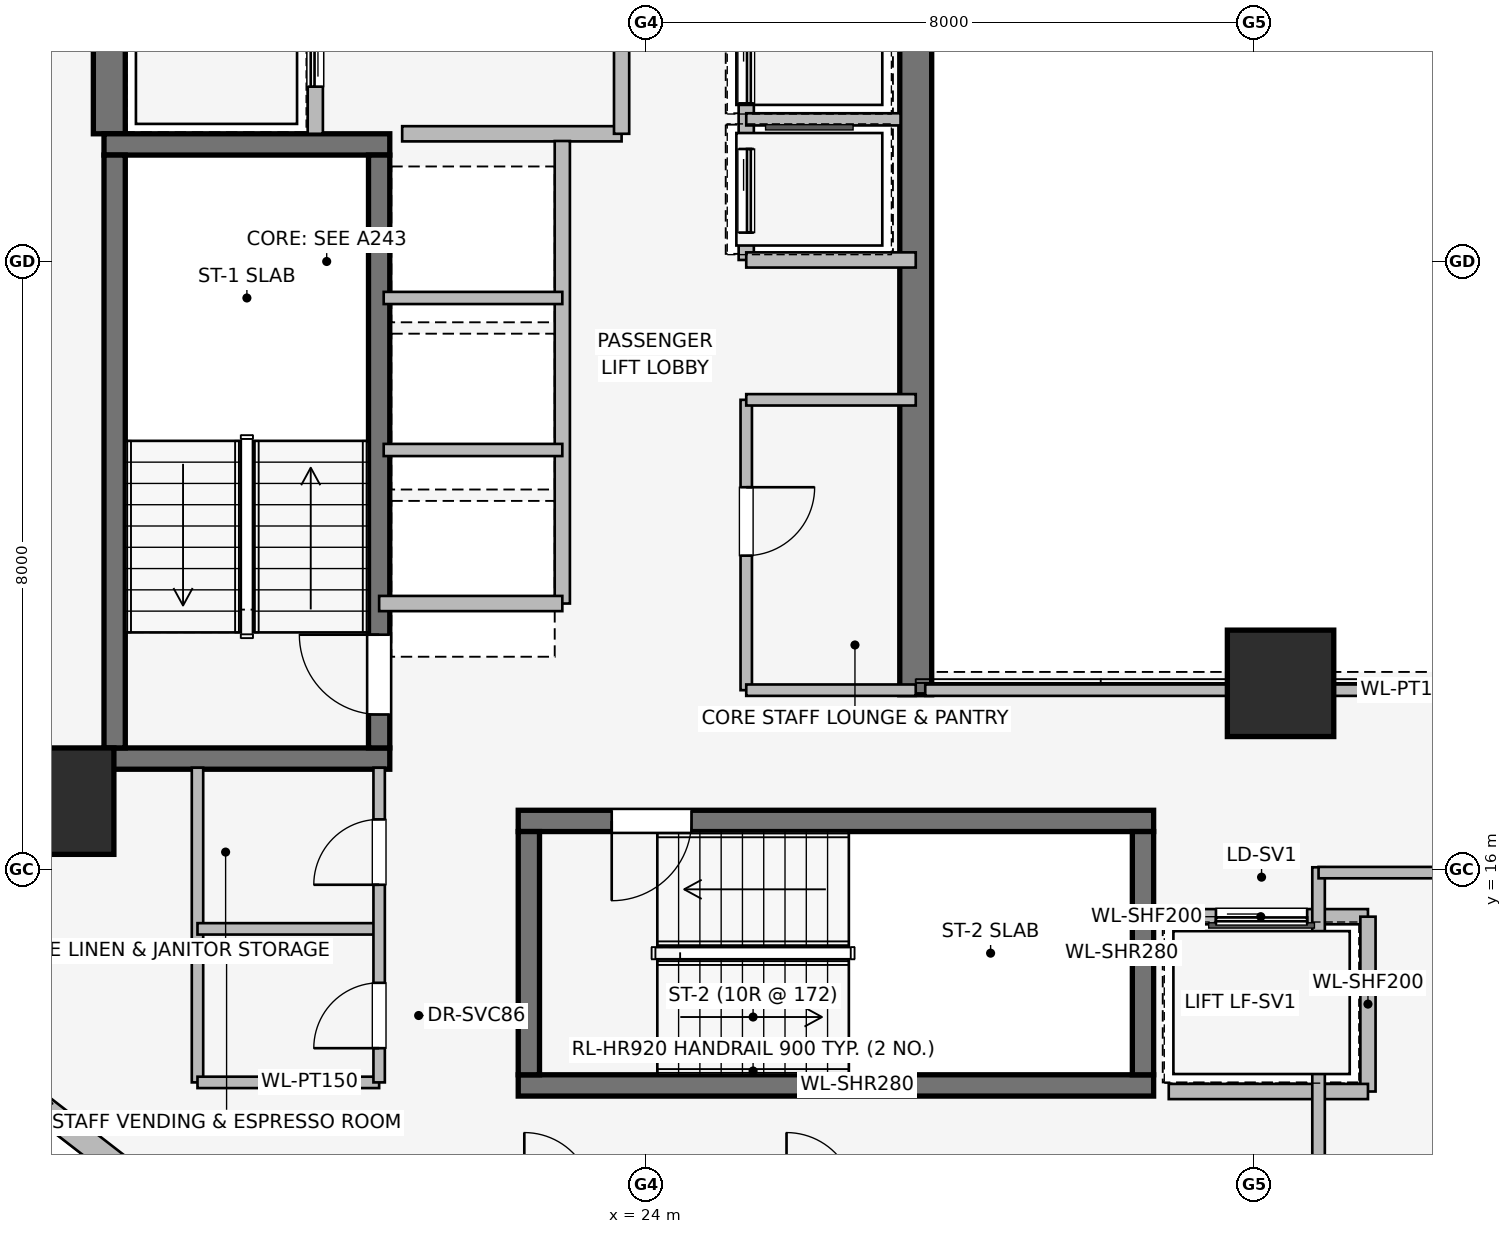
"""IFC4 building model, lengths in metres.
Left out: names, types, materials, properties, quantities, classifications, styles, units other than length and angle.
Written with IfcOpenShell. Run it as: python <this file> out.ifc"""

import sys

from ifc_helpers import new_model, si_unit, direction, frame, frame_2d, origin, origin_2d, place, context, subcontext, project, spatial, rectangle, extrude, element, fill, save


model = new_model("IFC4")
c1 = context("Model", 3, precision=1e-05, world=origin(), true_north=direction((0.0, 1.0)))
c2 = subcontext(c1, "Body", "Model", "MODEL_VIEW")
j1 = project(units=[si_unit("LENGTHUNIT", "METRE"), si_unit("PLANEANGLEUNIT", "RADIAN")], contexts=[c1])
p1 = place(None, origin())
s1 = spatial("IfcSite", under=j1, at=p1, CompositionType="ELEMENT")
p2 = place(p1, origin())
s2 = spatial("IfcBuilding", under=s1, at=p2, CompositionType="ELEMENT")
p3 = place(p2, frame((0.0, 0.0, 153.3)))
s3 = spatial("IfcBuildingStorey", under=s2, at=p3, CompositionType="ELEMENT", Elevation=153.3)
p4 = place(p3, frame((16.94, 25.68, 0.0), z_axis=(0.0, 0.0, 1.0), x_axis=(0.0, 1.0, 0.0)))
e1 = element("IfcWall", 1, at=p4, inside=s3, PredefinedType="SHEAR", context=c2, shape_type="SweptSolid", body=[
    extrude(rectangle(XDim=5.62, YDim=0.42, at=frame_2d((2.81, 0.0))), origin(), (0.0, 0.0, 1.0), 3.45),
])
p5 = place(p3, frame((27.55, 29.55, 0.0), z_axis=(0.0, 0.0, 1.0), x_axis=(0.0, -1.0, 0.0)))
e2 = element("IfcWall", 2, at=p5, inside=s3, PredefinedType="SHEAR", context=c2, shape_type="SweptSolid", body=[
    extrude(rectangle(XDim=11.25, YDim=0.42, at=frame_2d((5.625, 0.0))), origin(), (0.0, 0.0, 1.0), 3.45),
])
for number, where, z_axis, x_axis in (
    (3, (16.87, 17.46, 0.0), (0.0, 0.0, 1.0), (1.0, 0.0, 0.0)),
    (4, (20.63, 25.54, 0.0), (0.0, 0.0, 1.0), (-1.0, 0.0, 0.0)),
):
    element("IfcWall", number, at=place(p3, frame(where, z_axis=z_axis, x_axis=x_axis)), inside=s3, PredefinedType="SHEAR", context=c2, shape_type="SweptSolid", body=[
        extrude(rectangle(XDim=3.76, YDim=0.28, at=frame_2d((1.88, 0.0))), origin(), (0.0, 0.0, 1.0), 3.45),
    ])
p6 = place(p3, frame((17.01, 25.4, 0.0), z_axis=(0.0, 0.0, 1.0), x_axis=(0.0, -1.0, 0.0)))
e5 = element("IfcWall", 5, at=p6, inside=s3, PredefinedType="SHEAR", context=c2, shape_type="SweptSolid", body=[
    extrude(rectangle(XDim=7.8, YDim=0.28, at=frame_2d((3.9, 0.0))), origin(), (0.0, 0.0, 1.0), 3.45),
])
p7 = place(p3, frame((20.49, 17.6, 0.0), z_axis=(0.0, 0.0, 1.0), x_axis=(0.0, 1.0, 0.0)))
e6 = element("IfcWall", 6, at=p7, inside=s3, PredefinedType="SHEAR", context=c2, shape_type="SweptSolid", body=[
    extrude(rectangle(XDim=7.8, YDim=0.28, at=frame_2d((3.9, 0.0))), origin(), (0.0, 0.0, 1.0), 3.45),
])
p8 = place(p7, frame((0.44, 0.0, 0.0)))
e7 = element("IfcOpeningElement", 7, at=p8, cuts=e6, PredefinedType="OPENING", context=c2, shape_type="SweptSolid", body=[
    extrude(rectangle(XDim=1.05, YDim=2.0, at=frame_2d((0.525, 1.0))), frame((0.0, 0.15, 0.0), z_axis=(0.0, -1.0, 0.0), x_axis=(1.0, 0.0, 0.0)), (0.0, 0.0, 1.0), 0.3),
])
p9 = place(p3, frame((22.32, 13.16, 0.0), z_axis=(0.0, 0.0, 1.0), x_axis=(1.0, 0.0, 0.0)))
e8 = element("IfcWall", 8, at=p9, inside=s3, PredefinedType="SHEAR", context=c2, shape_type="SweptSolid", body=[
    extrude(rectangle(XDim=8.36, YDim=0.28, at=frame_2d((4.18, 0.0))), origin(), (0.0, 0.0, 1.0), 3.45),
])
p10 = place(p3, frame((30.68, 16.64, 0.0), z_axis=(0.0, 0.0, 1.0), x_axis=(-1.0, 0.0, 0.0)))
e9 = element("IfcWall", 9, at=p10, inside=s3, PredefinedType="SHEAR", context=c2, shape_type="SweptSolid", body=[
    extrude(rectangle(XDim=8.36, YDim=0.28, at=frame_2d((4.18, 0.0))), origin(), (0.0, 0.0, 1.0), 3.45),
])
p11 = place(p10, frame((6.08, 0.0, 0.0)))
e10 = element("IfcOpeningElement", 10, at=p11, cuts=e9, PredefinedType="OPENING", context=c2, shape_type="SweptSolid", body=[
    extrude(rectangle(XDim=1.05, YDim=2.0, at=frame_2d((0.525, 1.0))), frame((0.0, 0.15, 0.0), z_axis=(0.0, -1.0, 0.0), x_axis=(1.0, 0.0, 0.0)), (0.0, 0.0, 1.0), 0.3),
])
for number, where, z_axis, x_axis in (
    (11, (22.46, 16.5, 0.0), (0.0, 0.0, 1.0), (0.0, -1.0, 0.0)),
    (12, (30.54, 13.3, 0.0), (0.0, 0.0, 1.0), (0.0, 1.0, 0.0)),
):
    element("IfcWall", number, at=place(p3, frame(where, z_axis=z_axis, x_axis=x_axis)), inside=s3, PredefinedType="SHEAR", context=c2, shape_type="SweptSolid", body=[
        extrude(rectangle(XDim=3.2, YDim=0.28, at=frame_2d((1.6, 0.0))), origin(), (0.0, 0.0, 1.0), 3.45),
    ])
for number, where, z_axis, x_axis in (
    (13, (16.3, 16.9, 0.0), (0.0, 0.0, 1.0), (1.0, 0.0, 0.0)),
    (14, (32.35, 18.45, 0.0), (0.0, 0.0, 1.0), (1.0, 0.0, 0.0)),
):
    element("IfcColumn", number, at=place(p3, frame(where, z_axis=z_axis, x_axis=x_axis)), inside=s3, PredefinedType="COLUMN", context=c2, shape_type="SweptSolid", body=[
        extrude(rectangle(XDim=1.4, YDim=1.4, at=origin_2d()), origin(), (0.0, 0.0, 1.0), 3.45),
    ])
p12 = place(p3, frame((17.243, 11.95, 0.0), z_axis=(0.0, 0.0, 1.0), x_axis=(-0.790621329885, 0.612305408053, 0.0)))
e15 = element("IfcWall", 15, at=p12, inside=s3, PredefinedType="STANDARD", context=c2, shape_type="SweptSolid", body=[
    extrude(rectangle(XDim=1.676, YDim=0.33, at=frame_2d((0.838, 0.0))), origin(), (0.0, 0.0, 1.0), 3.19),
])
p13 = place(p3, frame((19.65, 25.68, 0.0), z_axis=(0.0, 0.0, 1.0), x_axis=(0.0, 1.0, 0.0)))
e16 = element("IfcWall", 16, at=p13, inside=s3, PredefinedType="PARTITIONING", context=c2, shape_type="SweptSolid", body=[
    extrude(rectangle(XDim=5.54, YDim=0.2, at=frame_2d((2.77, 0.0))), origin(), (0.0, 0.0, 1.0), 3.19),
])
p14 = place(p13, frame((0.62, 0.0, 0.0)))
e17 = element("IfcOpeningElement", 17, at=p14, cuts=e16, PredefinedType="OPENING", context=c2, shape_type="SweptSolid", body=[
    extrude(rectangle(XDim=1.1, YDim=2.2, at=frame_2d((0.55, 1.1))), frame((0.0, 0.11, 0.0), z_axis=(0.0, -1.0, 0.0), x_axis=(1.0, 0.0, 0.0)), (0.0, 0.0, 1.0), 0.22),
])
p15 = place(p13, frame((3.12, 0.0, 0.0)))
e18 = element("IfcOpeningElement", 18, at=p15, cuts=e16, PredefinedType="OPENING", context=c2, shape_type="SweptSolid", body=[
    extrude(rectangle(XDim=1.1, YDim=2.2, at=frame_2d((0.55, 1.1))), frame((0.0, 0.11, 0.0), z_axis=(0.0, -1.0, 0.0), x_axis=(1.0, 0.0, 0.0)), (0.0, 0.0, 1.0), 0.22),
])
p16 = place(p3, frame((20.793, 25.68, 0.0), z_axis=(0.0, 0.0, 1.0), x_axis=(1.0, 0.0, 0.0)))
e19 = element("IfcWall", 19, at=p16, inside=s3, PredefinedType="PARTITIONING", context=c2, shape_type="SweptSolid", body=[
    extrude(rectangle(XDim=2.887, YDim=0.2, at=frame_2d((1.443, 0.0))), origin(), (0.0, 0.0, 1.0), 3.19),
])
p17 = place(p3, frame((23.68, 25.68, 0.0), z_axis=(0.0, 0.0, 1.0), x_axis=(0.0, 1.0, 0.0)))
e20 = element("IfcWall", 20, at=p17, inside=s3, PredefinedType="PARTITIONING", context=c2, shape_type="SweptSolid", body=[
    extrude(rectangle(XDim=5.54, YDim=0.2, at=frame_2d((2.77, 0.0))), origin(), (0.0, 0.0, 1.0), 3.19),
])
p18 = place(p17, frame((1.8, 0.0, 0.0)))
e21 = element("IfcOpeningElement", 21, at=p18, cuts=e20, PredefinedType="OPENING", context=c2, shape_type="SweptSolid", body=[
    extrude(rectangle(XDim=1.05, YDim=2.0, at=frame_2d((0.525, 1.0))), frame((0.0, 0.11, 0.0), z_axis=(0.0, -1.0, 0.0), x_axis=(1.0, 0.0, 0.0)), (0.0, 0.0, 1.0), 0.22),
])
p19 = place(p3, frame((33.5, 15.38, 0.0), z_axis=(0.0, 0.0, 1.0), x_axis=(-1.0, 0.0, 0.0)))
e22 = element("IfcWall", 22, at=p19, inside=s3, PredefinedType="PARTITIONING", context=c2, shape_type="SweptSolid", body=[
    extrude(rectangle(XDim=2.82, YDim=0.2, at=frame_2d((1.41, 0.0))), origin(), (0.0, 0.0, 1.0), 3.19),
])
p20 = place(p19, frame((0.8, 0.0, 0.0)))
e23 = element("IfcOpeningElement", 23, at=p20, cuts=e22, PredefinedType="OPENING", context=c2, shape_type="SweptSolid", body=[
    extrude(rectangle(XDim=1.2, YDim=2.2, at=frame_2d((0.6, 1.1))), frame((0.0, 0.11, 0.0), z_axis=(0.0, -1.0, 0.0), x_axis=(1.0, 0.0, 0.0)), (0.0, 0.0, 1.0), 0.22),
])
p21 = place(p3, frame((33.5, 13.08, 0.0), z_axis=(0.0, 0.0, 1.0), x_axis=(0.0, 1.0, 0.0)))
e24 = element("IfcWall", 24, at=p21, inside=s3, PredefinedType="PARTITIONING", context=c2, shape_type="SweptSolid", body=[
    extrude(rectangle(XDim=2.3, YDim=0.2, at=frame_2d((1.15, 0.0))), origin(), (0.0, 0.0, 1.0), 3.19),
])
p22 = place(p3, frame((30.879, 13.08, 0.0), z_axis=(0.0, 0.0, 1.0), x_axis=(1.0, 0.0, 0.0)))
e25 = element("IfcWall", 25, at=p22, inside=s3, PredefinedType="PARTITIONING", context=c2, shape_type="SweptSolid", body=[
    extrude(rectangle(XDim=2.621, YDim=0.2, at=frame_2d((1.311, 0.0))), origin(), (0.0, 0.0, 1.0), 3.19),
])
p23 = place(p3, frame((22.9, 19.5, 0.0), z_axis=(0.0, 0.0, 1.0), x_axis=(0.0, 1.0, 0.0)))
e26 = element("IfcWall", 26, at=p23, inside=s3, PredefinedType="PARTITIONING", context=c2, shape_type="SweptSolid", body=[
    extrude(rectangle(XDim=6.085, YDim=0.2, at=frame_2d((3.042, 0.0))), origin(), (0.0, 0.0, 1.0), 3.19),
])
p24 = place(p3, frame((20.49, 19.5, 0.0), z_axis=(0.0, 0.0, 1.0), x_axis=(1.0, 0.0, 0.0)))
e27 = element("IfcWall", 27, at=p24, inside=s3, PredefinedType="PARTITIONING", context=c2, shape_type="SweptSolid", body=[
    extrude(rectangle(XDim=2.41, YDim=0.2, at=frame_2d((1.205, 0.0))), origin(), (0.0, 0.0, 1.0), 2.09),
])
for number, where, z_axis, x_axis in (
    (28, (20.55, 21.52, 0.0), (0.0, 0.0, 1.0), (1.0, 0.0, 0.0)),
    (29, (20.55, 23.52, 0.0), (0.0, 0.0, 1.0), (1.0, 0.0, 0.0)),
):
    element("IfcWall", number, at=place(p3, frame(where, z_axis=z_axis, x_axis=x_axis)), inside=s3, PredefinedType="PARTITIONING", context=c2, shape_type="SweptSolid", body=[
        extrude(rectangle(XDim=2.35, YDim=0.16, at=frame_2d((1.175, 0.0))), origin(), (0.0, 0.0, 1.0), 3.19),
    ])
p25 = place(p3, frame((25.32, 29.55, 0.0), z_axis=(0.0, 0.0, 1.0), x_axis=(0.0, -1.0, 0.0)))
e30 = element("IfcWall", 30, at=p25, inside=s3, PredefinedType="PARTITIONING", context=c2, shape_type="SweptSolid", body=[
    extrude(rectangle(XDim=5.53, YDim=0.2, at=frame_2d((2.765, 0.0))), origin(), (0.0, 0.0, 1.0), 3.19),
])
p26 = place(p25, frame((0.52, 0.0, 0.0)))
e31 = element("IfcOpeningElement", 31, at=p26, cuts=e30, PredefinedType="OPENING", context=c2, shape_type="SweptSolid", body=[
    extrude(rectangle(XDim=1.1, YDim=2.2, at=frame_2d((0.55, 1.1))), frame((0.0, 0.11, 0.0), z_axis=(0.0, -1.0, 0.0), x_axis=(1.0, 0.0, 0.0)), (0.0, 0.0, 1.0), 0.22),
])
p27 = place(p25, frame((2.37, 0.0, 0.0)))
e32 = element("IfcOpeningElement", 32, at=p27, cuts=e30, PredefinedType="OPENING", context=c2, shape_type="SweptSolid", body=[
    extrude(rectangle(XDim=1.1, YDim=2.2, at=frame_2d((0.55, 1.1))), frame((0.0, 0.11, 0.0), z_axis=(0.0, -1.0, 0.0), x_axis=(1.0, 0.0, 0.0)), (0.0, 0.0, 1.0), 0.22),
])
p28 = place(p25, frame((4.07, 0.0, 0.0)))
e33 = element("IfcOpeningElement", 33, at=p28, cuts=e30, PredefinedType="OPENING", context=c2, shape_type="SweptSolid", body=[
    extrude(rectangle(XDim=1.1, YDim=2.2, at=frame_2d((0.55, 1.1))), frame((0.0, 0.11, 0.0), z_axis=(0.0, -1.0, 0.0), x_axis=(1.0, 0.0, 0.0)), (0.0, 0.0, 1.0), 0.22),
])
p29 = place(p3, frame((25.32, 24.02, 0.0), z_axis=(0.0, 0.0, 1.0), x_axis=(1.0, 0.0, 0.0)))
e34 = element("IfcWall", 34, at=p29, inside=s3, PredefinedType="PARTITIONING", context=c2, shape_type="SweptSolid", body=[
    extrude(rectangle(XDim=2.23, YDim=0.2, at=frame_2d((1.115, 0.0))), origin(), (0.0, 0.0, 1.0), 3.19),
])
p30 = place(p3, frame((25.32, 25.87, 0.0), z_axis=(0.0, 0.0, 1.0), x_axis=(1.0, 0.0, 0.0)))
e35 = element("IfcWall", 35, at=p30, inside=s3, PredefinedType="PARTITIONING", context=c2, shape_type="SweptSolid", body=[
    extrude(rectangle(XDim=2.03, YDim=0.16, at=frame_2d((1.015, 0.0))), origin(), (0.0, 0.0, 1.0), 3.19),
])
p31 = place(p3, frame((25.32, 22.18, 0.0), z_axis=(0.0, 0.0, 1.0), x_axis=(0.0, -1.0, 0.0)))
e36 = element("IfcWall", 36, at=p31, inside=s3, PredefinedType="PARTITIONING", context=c2, shape_type="SweptSolid", body=[
    extrude(rectangle(XDim=3.82, YDim=0.15, at=frame_2d((1.91, 0.0))), origin(), (0.0, 0.0, 1.0), 3.19),
])
p32 = place(p31, frame((1.15, 0.0, 0.0)))
e37 = element("IfcOpeningElement", 37, at=p32, cuts=e36, PredefinedType="OPENING", context=c2, shape_type="SweptSolid", body=[
    extrude(rectangle(XDim=0.9, YDim=2.0, at=frame_2d((0.45, 1.0))), frame((0.0, 0.085, 0.0), z_axis=(0.0, -1.0, 0.0), x_axis=(1.0, 0.0, 0.0)), (0.0, 0.0, 1.0), 0.17),
])
for number, where, z_axis, x_axis in (
    (38, (25.32, 22.18, 0.0), (0.0, 0.0, 1.0), (1.0, 0.0, 0.0)),
    (39, (25.32, 18.36, 0.0), (0.0, 0.0, 1.0), (1.0, 0.0, 0.0)),
):
    element("IfcWall", number, at=place(p3, frame(where, z_axis=z_axis, x_axis=x_axis)), inside=s3, PredefinedType="PARTITIONING", context=c2, shape_type="SweptSolid", body=[
        extrude(rectangle(XDim=2.23, YDim=0.15, at=frame_2d((1.115, 0.0))), origin(), (0.0, 0.0, 1.0), 3.19),
    ])
p33 = place(p3, frame((18.1, 17.34, 0.0), z_axis=(0.0, 0.0, 1.0), x_axis=(0.0, -1.0, 0.0)))
e40 = element("IfcWall", 40, at=p33, inside=s3, PredefinedType="PARTITIONING", context=c2, shape_type="SweptSolid", body=[
    extrude(rectangle(XDim=4.14, YDim=0.15, at=frame_2d((2.07, 0.0))), origin(), (0.0, 0.0, 1.0), 3.19),
])
for number, where, z_axis, x_axis in (
    (41, (18.1, 13.2, 0.0), (0.0, 0.0, 1.0), (1.0, 0.0, 0.0)),
    (42, (18.1, 15.22, 0.0), (0.0, 0.0, 1.0), (1.0, 0.0, 0.0)),
):
    element("IfcWall", number, at=place(p3, frame(where, z_axis=z_axis, x_axis=x_axis)), inside=s3, PredefinedType="PARTITIONING", context=c2, shape_type="SweptSolid", body=[
        extrude(rectangle(XDim=2.39, YDim=0.15, at=frame_2d((1.195, 0.0))), origin(), (0.0, 0.0, 1.0), 3.19),
    ])
p34 = place(p3, frame((20.49, 13.2, 0.0), z_axis=(0.0, 0.0, 1.0), x_axis=(0.0, 1.0, 0.0)))
e43 = element("IfcWall", 43, at=p34, inside=s3, PredefinedType="PARTITIONING", context=c2, shape_type="SweptSolid", body=[
    extrude(rectangle(XDim=4.14, YDim=0.15, at=frame_2d((2.07, 0.0))), origin(), (0.0, 0.0, 1.0), 3.19),
])
p35 = place(p34, frame((0.45, 0.0, 0.0)))
e44 = element("IfcOpeningElement", 44, at=p35, cuts=e43, PredefinedType="OPENING", context=c2, shape_type="SweptSolid", body=[
    extrude(rectangle(XDim=0.86, YDim=2.0, at=frame_2d((0.43, 1.0))), frame((0.0, 0.085, 0.0), z_axis=(0.0, -1.0, 0.0), x_axis=(1.0, 0.0, 0.0)), (0.0, 0.0, 1.0), 0.17),
])
p36 = place(p34, frame((2.6, 0.0, 0.0)))
e45 = element("IfcOpeningElement", 45, at=p36, cuts=e43, PredefinedType="OPENING", context=c2, shape_type="SweptSolid", body=[
    extrude(rectangle(XDim=0.86, YDim=2.0, at=frame_2d((0.43, 1.0))), frame((0.0, 0.085, 0.0), z_axis=(0.0, -1.0, 0.0), x_axis=(1.0, 0.0, 0.0)), (0.0, 0.0, 1.0), 0.17),
])
p37 = place(p3, frame((27.675, 18.36, 0.0), z_axis=(0.0, 0.0, 1.0), x_axis=(1.0, 0.0, 0.0)))
e46 = element("IfcWall", 46, at=p37, inside=s3, PredefinedType="PARTITIONING", context=c2, shape_type="SweptSolid", body=[
    extrude(rectangle(XDim=12.165, YDim=0.15, at=frame_2d((6.083, 0.0))), origin(), (0.0, 0.0, 1.0), 2.331),
])
p38 = place(p3, frame((32.85, 4.04, 0.0), z_axis=(0.0, 0.0, 1.0), x_axis=(0.0, 1.0, 0.0)))
e47 = element("IfcWall", 47, at=p38, inside=s3, PredefinedType="PARTITIONING", context=c2, shape_type="SweptSolid", body=[
    extrude(rectangle(XDim=11.99, YDim=0.165, at=frame_2d((5.995, 0.0))), origin(), (0.0, 0.0, 1.0), 3.19),
])
p39 = place(p3, frame((32.85, 15.96, 0.0), z_axis=(0.0, 0.0, 1.0), x_axis=(1.0, 0.0, 0.0)))
e48 = element("IfcWall", 48, at=p39, inside=s3, PredefinedType="PARTITIONING", context=c2, shape_type="SweptSolid", body=[
    extrude(rectangle(XDim=11.571, YDim=0.15, at=frame_2d((5.785, 0.0))), origin(), (0.0, 0.0, 1.0), 3.19),
])
p40 = place(p39, frame((5.306, 0.0, 0.0)))
e49 = element("IfcOpeningElement", 49, at=p40, cuts=e48, PredefinedType="OPENING", context=c2, shape_type="SweptSolid", body=[
    extrude(rectangle(XDim=0.96, YDim=2.0, at=frame_2d((0.48, 1.0))), frame((0.0, 0.085, 0.0), z_axis=(0.0, -1.0, 0.0), x_axis=(1.0, 0.0, 0.0)), (0.0, 0.0, 1.0), 0.17),
])
p41 = place(p8, origin())
e50 = element("IfcDoor", 50, at=p41, inside=s3, OperationType="SINGLE_SWING_RIGHT", PredefinedType="DOOR", context=c2, shape_type="SweptSolid", body=[
    extrude(rectangle(XDim=1.05, YDim=2.0, at=frame_2d((0.525, 1.0))), frame((0.0, 0.025, 0.0), z_axis=(0.0, -1.0, 0.0), x_axis=(1.0, 0.0, 0.0)), (0.0, 0.0, 1.0), 0.05),
])
fill(e7, e50)
p42 = place(p11, origin())
e51 = element("IfcDoor", 51, at=p42, inside=s3, OperationType="SINGLE_SWING_RIGHT", PredefinedType="DOOR", context=c2, shape_type="SweptSolid", body=[
    extrude(rectangle(XDim=1.05, YDim=2.0, at=frame_2d((0.525, 1.0))), frame((0.0, 0.025, 0.0), z_axis=(0.0, -1.0, 0.0), x_axis=(1.0, 0.0, 0.0)), (0.0, 0.0, 1.0), 0.05),
])
fill(e10, e51)
p43 = place(p14, origin())
e52 = element("IfcDoor", 52, at=p43, inside=s3, OperationType="SLIDING_TO_LEFT", PredefinedType="DOOR", context=c2, shape_type="SweptSolid", body=[
    extrude(rectangle(XDim=1.1, YDim=2.2, at=frame_2d((0.55, 1.1))), frame((0.0, 0.025, 0.0), z_axis=(0.0, -1.0, 0.0), x_axis=(1.0, 0.0, 0.0)), (0.0, 0.0, 1.0), 0.05),
])
fill(e17, e52)
p44 = place(p20, origin())
e53 = element("IfcDoor", 53, at=p44, inside=s3, OperationType="SLIDING_TO_RIGHT", PredefinedType="DOOR", context=c2, shape_type="SweptSolid", body=[
    extrude(rectangle(XDim=1.2, YDim=2.2, at=frame_2d((0.6, 1.1))), frame((0.0, 0.025, 0.0), z_axis=(0.0, -1.0, 0.0), x_axis=(1.0, 0.0, 0.0)), (0.0, 0.0, 1.0), 0.05),
])
fill(e23, e53)
p45 = place(p27, origin())
e54 = element("IfcDoor", 54, at=p45, inside=s3, OperationType="SLIDING_TO_LEFT", PredefinedType="DOOR", context=c2, shape_type="SweptSolid", body=[
    extrude(rectangle(XDim=1.1, YDim=2.2, at=frame_2d((0.55, 1.1))), frame((0.0, 0.025, 0.0), z_axis=(0.0, -1.0, 0.0), x_axis=(1.0, 0.0, 0.0)), (0.0, 0.0, 1.0), 0.05),
])
fill(e32, e54)
p46 = place(p28, origin())
e55 = element("IfcDoor", 55, at=p46, inside=s3, OperationType="SLIDING_TO_LEFT", PredefinedType="DOOR", context=c2, shape_type="SweptSolid", body=[
    extrude(rectangle(XDim=1.1, YDim=2.2, at=frame_2d((0.55, 1.1))), frame((0.0, 0.025, 0.0), z_axis=(0.0, -1.0, 0.0), x_axis=(1.0, 0.0, 0.0)), (0.0, 0.0, 1.0), 0.05),
])
fill(e33, e55)
p47 = place(p32, origin())
e56 = element("IfcDoor", 56, at=p47, inside=s3, OperationType="SINGLE_SWING_LEFT", PredefinedType="DOOR", context=c2, shape_type="SweptSolid", body=[
    extrude(rectangle(XDim=0.9, YDim=2.0, at=frame_2d((0.45, 1.0))), frame((0.0, 0.025, 0.0), z_axis=(0.0, -1.0, 0.0), x_axis=(1.0, 0.0, 0.0)), (0.0, 0.0, 1.0), 0.05),
])
fill(e37, e56)
p48 = place(p35, origin())
e57 = element("IfcDoor", 57, at=p48, inside=s3, OperationType="SINGLE_SWING_LEFT", PredefinedType="DOOR", context=c2, shape_type="SweptSolid", body=[
    extrude(rectangle(XDim=0.86, YDim=2.0, at=frame_2d((0.43, 1.0))), frame((0.0, 0.025, 0.0), z_axis=(0.0, -1.0, 0.0), x_axis=(1.0, 0.0, 0.0)), (0.0, 0.0, 1.0), 0.05),
])
fill(e44, e57)
p49 = place(p36, origin())
e58 = element("IfcDoor", 58, at=p49, inside=s3, OperationType="SINGLE_SWING_LEFT", PredefinedType="DOOR", context=c2, shape_type="SweptSolid", body=[
    extrude(rectangle(XDim=0.86, YDim=2.0, at=frame_2d((0.43, 1.0))), frame((0.0, 0.025, 0.0), z_axis=(0.0, -1.0, 0.0), x_axis=(1.0, 0.0, 0.0)), (0.0, 0.0, 1.0), 0.05),
])
fill(e45, e58)
save(model, sys.argv[1])
